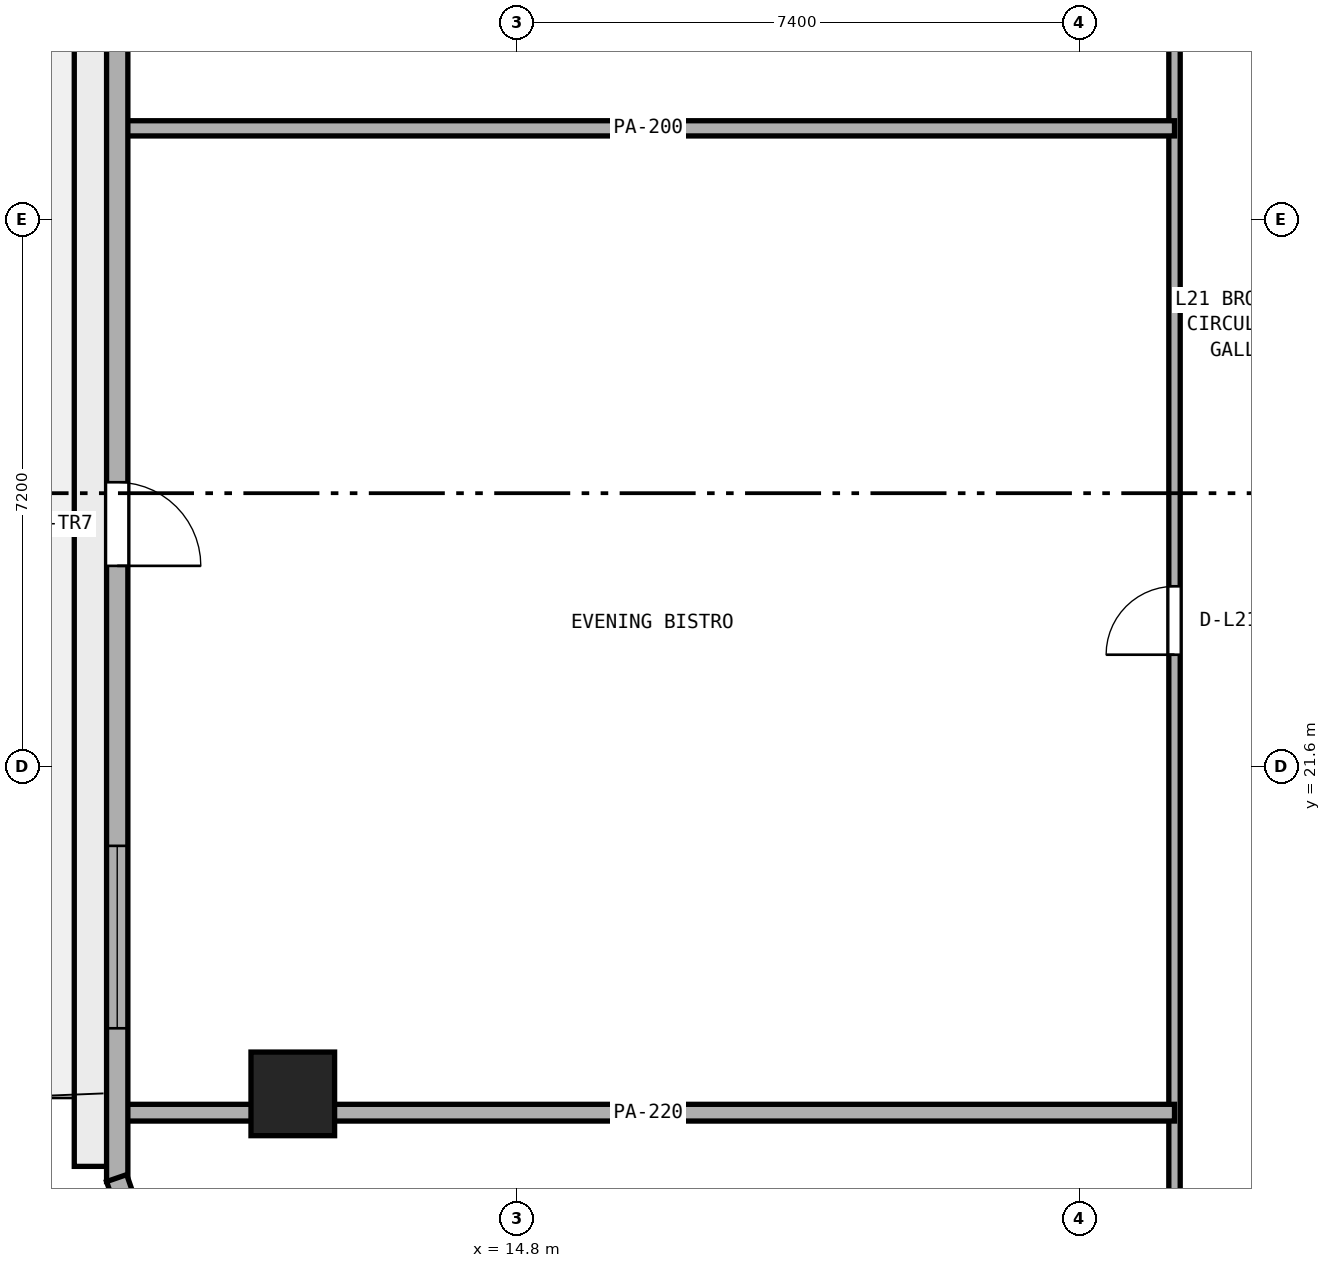
"""IFC4 building model, lengths in metres.
Left out: names, types, materials, properties, quantities, classifications, styles, units other than length and angle.
Written with IfcOpenShell. Run it as: python <this file> out.ifc"""

import sys

from ifc_helpers import new_model, si_unit, direction, frame, frame_2d, origin, origin_2d, place, context, subcontext, project, spatial, rectangle, extrude, element, fill, save


model = new_model("IFC4")
c1 = context("Model", 3, precision=1e-05, world=origin(), true_north=direction((0.0, 1.0)))
c2 = subcontext(c1, "Body", "Model", "MODEL_VIEW")
j1 = project(units=[si_unit("LENGTHUNIT", "METRE"), si_unit("PLANEANGLEUNIT", "RADIAN")], contexts=[c1])
p1 = place(None, origin())
s1 = spatial("IfcSite", under=j1, at=p1, CompositionType="ELEMENT")
p2 = place(p1, origin())
s2 = spatial("IfcBuilding", under=s1, at=p2, CompositionType="ELEMENT")
p3 = place(p2, frame((0.0, 0.0, 85.8)))
s3 = spatial("IfcBuildingStorey", under=s2, at=p3, CompositionType="ELEMENT", Elevation=85.8)
p4 = place(p3, frame((11.85, 17.298, 0.0), z_axis=(0.0, 0.0, 1.0), x_axis=(1.0, 0.0, 0.0)))
e1 = element("IfcColumn", 1, at=p4, inside=s3, PredefinedType="COLUMN", context=c2, shape_type="SweptSolid", body=[
    extrude(rectangle(XDim=1.1, YDim=1.1, at=origin_2d()), origin(), (0.0, 0.0, 1.0), 3.8),
])
p5 = place(p3, frame((23.45, 15.05, 0.0), z_axis=(0.0, 0.0, 1.0), x_axis=(0.0, 1.0, 0.0)))
e2 = element("IfcWall", 2, at=p5, inside=s3, PredefinedType="PARTITIONING", context=c2, shape_type="SweptSolid", body=[
    extrude(rectangle(XDim=20.3, YDim=0.15, at=frame_2d((10.15, 0.0))), origin(), (0.0, 0.0, 1.0), 3.525),
])
p6 = place(p5, frame((8.025, 0.0, 0.0)))
e3 = element("IfcOpeningElement", 3, at=p6, cuts=e2, PredefinedType="OPENING", context=c2, shape_type="SweptSolid", body=[
    extrude(rectangle(XDim=0.9, YDim=2.1, at=frame_2d((0.45, 1.05))), frame((0.0, 0.085, 0.0), z_axis=(0.0, -1.0, 0.0), x_axis=(1.0, 0.0, 0.0)), (0.0, 0.0, 1.0), 0.17),
])
p7 = place(p5, frame((16.175, 0.0, 0.0)))
e4 = element("IfcOpeningElement", 4, at=p7, cuts=e2, PredefinedType="OPENING", context=c2, shape_type="SweptSolid", body=[
    extrude(rectangle(XDim=0.9, YDim=2.1, at=frame_2d((0.45, 1.05))), frame((0.0, 0.085, 0.0), z_axis=(0.0, -1.0, 0.0), x_axis=(1.0, 0.0, 0.0)), (0.0, 0.0, 1.0), 0.17),
])
p8 = place(p3, frame((9.605, 17.05, 0.0), z_axis=(0.0, 0.0, 1.0), x_axis=(1.0, 0.0, 0.0)))
e5 = element("IfcWall", 5, at=p8, inside=s3, PredefinedType="PARTITIONING", context=c2, shape_type="SweptSolid", body=[
    extrude(rectangle(XDim=13.845, YDim=0.22, at=frame_2d((6.922, 0.0))), origin(), (0.0, 0.0, 1.0), 2.908),
])
p9 = place(p3, frame((9.605, 30.0, 0.0), z_axis=(0.0, 0.0, 1.0), x_axis=(1.0, 0.0, 0.0)))
e6 = element("IfcWall", 6, at=p9, inside=s3, PredefinedType="PARTITIONING", context=c2, shape_type="SweptSolid", body=[
    extrude(rectangle(XDim=13.845, YDim=0.2, at=frame_2d((6.922, 0.0))), origin(), (0.0, 0.0, 1.0), 3.525),
])
p10 = place(p3, frame((9.54, 33.444, 0.0), z_axis=(0.0, 0.0, 1.0), x_axis=(0.0, -1.0, 0.0)))
e7 = element("IfcWall", 7, at=p10, inside=s3, PredefinedType="STANDARD", context=c2, shape_type="SweptSolid", body=[
    extrude(rectangle(XDim=17.301, YDim=0.28, at=frame_2d((8.65, 0.0))), origin(), (0.0, 0.0, 1.0), 3.525),
])
p11 = place(p10, frame((8.1, 0.0, 0.0)))
e8 = element("IfcOpeningElement", 8, at=p11, cuts=e7, PredefinedType="OPENING", context=c2, shape_type="SweptSolid", body=[
    extrude(rectangle(XDim=1.1, YDim=2.2, at=frame_2d((0.55, 1.1))), frame((0.0, 0.15, 0.0), z_axis=(0.0, -1.0, 0.0), x_axis=(1.0, 0.0, 0.0)), (0.0, 0.0, 1.0), 0.3),
])
p12 = place(p10, frame((12.884, 0.0, 0.9)))
e9 = element("IfcOpeningElement", 9, at=p12, cuts=e7, PredefinedType="OPENING", context=c2, shape_type="SweptSolid", body=[
    extrude(rectangle(XDim=2.4, YDim=1.75, at=frame_2d((1.2, 0.875))), frame((0.0, 0.15, 0.0), z_axis=(0.0, -1.0, 0.0), x_axis=(1.0, 0.0, 0.0)), (0.0, 0.0, 1.0), 0.3),
])
p13 = place(p3, frame((9.532, 16.189, 0.0), z_axis=(0.0, 0.0, 1.0), x_axis=(0.32708309668, -0.944995580871, 0.0)))
e10 = element("IfcWall", 10, at=p13, inside=s3, PredefinedType="STANDARD", context=c2, shape_type="SweptSolid", body=[
    extrude(rectangle(XDim=2.748, YDim=0.28, at=frame_2d((1.374, 0.0))), origin(), (0.0, 0.0, 1.0), 3.525),
])
p14 = place(p6, origin())
e11 = element("IfcDoor", 11, at=p14, inside=s3, OperationType="SINGLE_SWING_LEFT", PredefinedType="DOOR", context=c2, shape_type="SweptSolid", body=[
    extrude(rectangle(XDim=0.9, YDim=2.1, at=frame_2d((0.45, 1.05))), frame((0.0, 0.025, 0.0), z_axis=(0.0, -1.0, 0.0), x_axis=(1.0, 0.0, 0.0)), (0.0, 0.0, 1.0), 0.05),
])
fill(e3, e11)
p15 = place(p11, origin())
e12 = element("IfcDoor", 12, at=p15, inside=s3, OperationType="SINGLE_SWING_RIGHT", PredefinedType="DOOR", context=c2, shape_type="SweptSolid", body=[
    extrude(rectangle(XDim=1.1, YDim=2.2, at=frame_2d((0.55, 1.1))), frame((0.0, 0.025, 0.0), z_axis=(0.0, -1.0, 0.0), x_axis=(1.0, 0.0, 0.0)), (0.0, 0.0, 1.0), 0.05),
])
fill(e8, e12)
p16 = place(p12, origin())
e13 = element("IfcWindow", 13, at=p16, inside=s3, PartitioningType="SINGLE_PANEL", PredefinedType="WINDOW", context=c2, shape_type="SweptSolid", body=[
    extrude(rectangle(XDim=2.4, YDim=1.75, at=frame_2d((1.2, 0.875))), frame((0.0, 0.03, 0.0), z_axis=(0.0, -1.0, 0.0), x_axis=(1.0, 0.0, 0.0)), (0.0, 0.0, 1.0), 0.06),
])
fill(e9, e13)
save(model, sys.argv[1])
